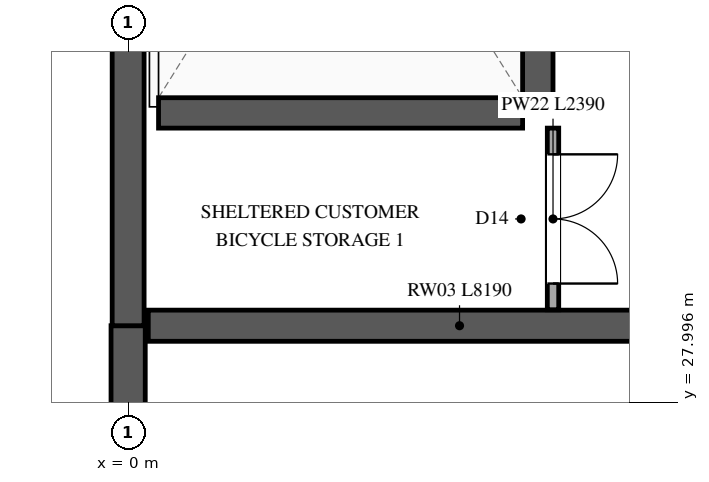
"""IFC4 building model, lengths in metres.
Left out: names, types, materials, properties, quantities, classifications, styles, units other than length and angle.
Written with IfcOpenShell. Run it as: python <this file> out.ifc"""

import sys

from ifc_helpers import new_model, si_unit, direction, frame, frame_2d, origin, place, context, subcontext, project, spatial, rectangle, extrude, element, fill, save


model = new_model("IFC4")
c1 = context("Model", 3, precision=1e-05, world=origin(), true_north=direction((0.0, 1.0)))
c2 = subcontext(c1, "Body", "Model", "MODEL_VIEW")
j1 = project(units=[si_unit("LENGTHUNIT", "METRE"), si_unit("PLANEANGLEUNIT", "RADIAN")], contexts=[c1])
p1 = place(None, origin())
s1 = spatial("IfcSite", under=j1, at=p1, CompositionType="ELEMENT")
p2 = place(p1, origin())
s2 = spatial("IfcBuilding", under=s1, at=p2, CompositionType="ELEMENT")
p3 = place(p2, frame((0.0, 0.0, -4.8)))
s3 = spatial("IfcBuildingStorey", under=s2, at=p3, CompositionType="ELEMENT", Elevation=-4.8)
p4 = place(p3, frame((0.0, 25.677, 0.0), z_axis=(0.0, 0.0, 1.0), x_axis=(0.0, 1.0, 0.0)))
e1 = element("IfcWall", 1, at=p4, inside=s3, PredefinedType="USERDEFINED", context=c2, shape_type="SweptSolid", body=[
    extrude(rectangle(XDim=3.323, YDim=0.45, at=frame_2d((1.662, 0.0))), origin(), (0.0, 0.0, 1.0), 4.58),
])
p5 = place(p3, frame((0.0, 29.0, 0.0), z_axis=(0.0, 0.0, 1.0), x_axis=(0.0, 1.0, 0.0)))
e2 = element("IfcWall", 2, at=p5, inside=s3, PredefinedType="USERDEFINED", context=c2, shape_type="SweptSolid", body=[
    extrude(rectangle(XDim=4.098, YDim=0.42, at=frame_2d((2.049, 0.0))), origin(), (0.0, 0.0, 1.0), 4.46),
])
p6 = place(p3, frame((8.455, 29.0, 0.0), z_axis=(0.0, 0.0, 1.0), x_axis=(-1.0, 0.0, 0.0)))
e3 = element("IfcWall", 3, at=p6, inside=s3, PredefinedType="USERDEFINED", context=c2, shape_type="SweptSolid", body=[
    extrude(rectangle(XDim=8.19, YDim=0.41, at=frame_2d((4.095, 0.0))), origin(), (0.0, 0.0, 1.0), 4.46),
])
p7 = place(p3, frame((5.39, 42.0, 0.0), z_axis=(0.0, 0.0, 1.0), x_axis=(0.0, -1.0, 0.0)))
e4 = element("IfcWall", 4, at=p7, inside=s3, PredefinedType="SHEAR", context=c2, shape_type="SweptSolid", body=[
    extrude(rectangle(XDim=10.0, YDim=0.4, at=frame_2d((5.0, 0.0))), origin(), (0.0, 0.0, 1.0), 4.8),
])
p8 = place(p7, frame((0.41, 0.0, 0.0)))
e5 = element("IfcOpeningElement", 5, at=p8, cuts=e4, PredefinedType="OPENING", context=c2, shape_type="SweptSolid", body=[
    extrude(rectangle(XDim=1.5, YDim=2.2, at=frame_2d((0.75, 1.1))), frame((0.0, 0.21, 0.0), z_axis=(0.0, -1.0, 0.0), x_axis=(1.0, 0.0, 0.0)), (0.0, 0.0, 1.0), 0.42),
])
p9 = place(p3, frame((5.19, 31.8, 0.0), z_axis=(0.0, 0.0, 1.0), x_axis=(-1.0, 0.0, 0.0)))
e6 = element("IfcWall", 6, at=p9, inside=s3, PredefinedType="SHEAR", context=c2, shape_type="SweptSolid", body=[
    extrude(rectangle(XDim=4.79, YDim=0.4, at=frame_2d((2.395, 0.0))), origin(), (0.0, 0.0, 1.0), 4.8),
])
p10 = place(p3, frame((5.59, 31.6, 0.0), z_axis=(0.0, 0.0, 1.0), x_axis=(0.0, -1.0, 0.0)))
e7 = element("IfcWall", 7, at=p10, inside=s3, PredefinedType="PARTITIONING", context=c2, shape_type="SweptSolid", body=[
    extrude(rectangle(XDim=2.39, YDim=0.15, at=frame_2d((1.195, 0.0))), origin(), (0.0, 0.0, 1.0), 4.44),
])
p11 = place(p10, frame((0.345, 0.0, 0.0)))
e8 = element("IfcOpeningElement", 8, at=p11, cuts=e7, PredefinedType="OPENING", context=c2, shape_type="SweptSolid", body=[
    extrude(rectangle(XDim=1.7, YDim=2.2, at=frame_2d((0.85, 1.1))), frame((0.0, 0.085, 0.0), z_axis=(0.0, -1.0, 0.0), x_axis=(1.0, 0.0, 0.0)), (0.0, 0.0, 1.0), 0.17),
])
p12 = place(p11, origin())
e9 = element("IfcDoor", 9, at=p12, inside=s3, OperationType="DOUBLE_DOOR_SINGLE_SWING", PredefinedType="DOOR", context=c2, shape_type="SweptSolid", body=[
    extrude(rectangle(XDim=1.7, YDim=2.2, at=frame_2d((0.85, 1.1))), frame((0.0, 0.025, 0.0), z_axis=(0.0, -1.0, 0.0), x_axis=(1.0, 0.0, 0.0)), (0.0, 0.0, 1.0), 0.05),
])
fill(e8, e9)
save(model, sys.argv[1])
